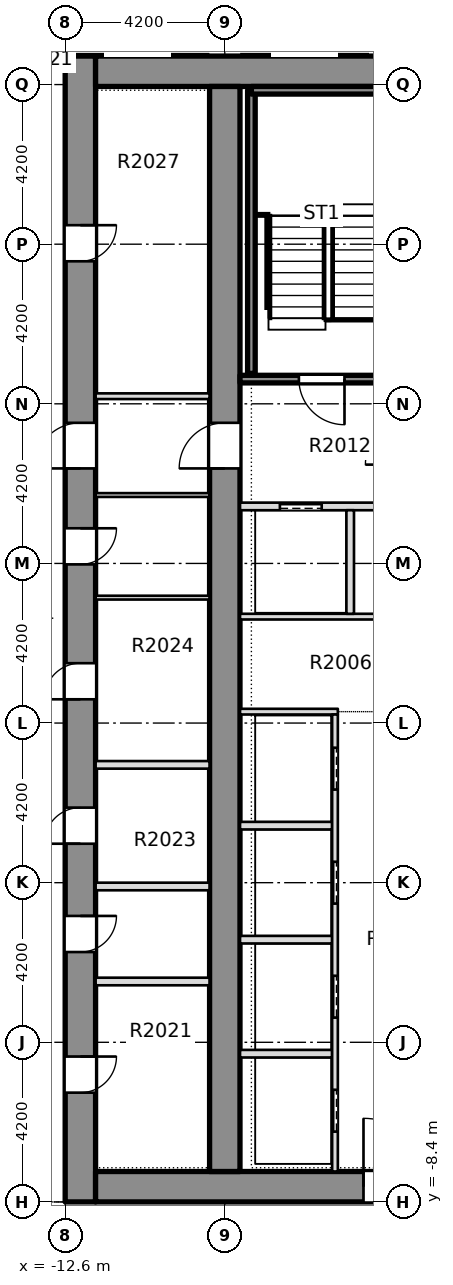
"""IFC4 building model, lengths in metres.
Left out: names, types, materials, properties, quantities, classifications, styles, units other than length and angle.
Written with IfcOpenShell. Run it as: python <this file> out.ifc"""

import sys

from ifc_helpers import new_model, si_unit, direction, frame, frame_2d, origin, place, context, subcontext, project, spatial, rectangle, extrude, element, fill, save


model = new_model("IFC4")
c1 = context("Model", 3, precision=1e-05, world=origin(), true_north=direction((0.0, 1.0)))
c2 = subcontext(c1, "Body", "Model", "MODEL_VIEW")
j1 = project(units=[si_unit("LENGTHUNIT", "METRE"), si_unit("PLANEANGLEUNIT", "RADIAN")], contexts=[c1])
p1 = place(None, origin())
s1 = spatial("IfcSite", under=j1, at=p1, CompositionType="ELEMENT")
p2 = place(p1, origin())
s2 = spatial("IfcBuilding", under=s1, at=p2, CompositionType="ELEMENT")
p3 = place(p2, frame((0.0, 0.0, 83.85)))
s3 = spatial("IfcBuildingStorey", under=s2, at=p3, CompositionType="ELEMENT", Elevation=83.85)
p4 = place(p3, frame((-12.2, -8.4, -0.32), z_axis=(0.0, 0.0, 1.0), x_axis=(0.0, 1.0, 0.0)))
e1 = element("IfcWall", 1, at=p4, inside=s3, PredefinedType="SHEAR", context=c2, shape_type="SweptSolid", body=[
    extrude(rectangle(XDim=30.15, YDim=0.8, at=frame_2d((15.075, 0.0))), origin(), (0.0, 0.0, 1.0), 3.45),
])
p5 = place(p4, frame((2.875, 0.0, 0.32)))
e2 = element("IfcOpeningElement", 2, at=p5, cuts=e1, PredefinedType="OPENING", context=c2, shape_type="SweptSolid", body=[
    extrude(rectangle(XDim=0.95, YDim=2.1, at=frame_2d((0.475, 1.05))), frame((0.0, 0.41, 0.0), z_axis=(0.0, -1.0, 0.0), x_axis=(1.0, 0.0, 0.0)), (0.0, 0.0, 1.0), 0.82),
])
p6 = place(p4, frame((6.575, 0.0, 0.32)))
e3 = element("IfcOpeningElement", 3, at=p6, cuts=e1, PredefinedType="OPENING", context=c2, shape_type="SweptSolid", body=[
    extrude(rectangle(XDim=0.95, YDim=2.1, at=frame_2d((0.475, 1.05))), frame((0.0, 0.41, 0.0), z_axis=(0.0, -1.0, 0.0), x_axis=(1.0, 0.0, 0.0)), (0.0, 0.0, 1.0), 0.82),
])
p7 = place(p4, frame((9.425, 0.0, 0.32)))
e4 = element("IfcOpeningElement", 4, at=p7, cuts=e1, PredefinedType="OPENING", context=c2, shape_type="SweptSolid", body=[
    extrude(rectangle(XDim=0.95, YDim=2.1, at=frame_2d((0.475, 1.05))), frame((0.0, 0.41, 0.0), z_axis=(0.0, -1.0, 0.0), x_axis=(1.0, 0.0, 0.0)), (0.0, 0.0, 1.0), 0.82),
])
p8 = place(p4, frame((13.225, 0.0, 0.32)))
e5 = element("IfcOpeningElement", 5, at=p8, cuts=e1, PredefinedType="OPENING", context=c2, shape_type="SweptSolid", body=[
    extrude(rectangle(XDim=0.95, YDim=2.1, at=frame_2d((0.475, 1.05))), frame((0.0, 0.41, 0.0), z_axis=(0.0, -1.0, 0.0), x_axis=(1.0, 0.0, 0.0)), (0.0, 0.0, 1.0), 0.82),
])
p9 = place(p4, frame((16.775, 0.0, 0.32)))
e6 = element("IfcOpeningElement", 6, at=p9, cuts=e1, PredefinedType="OPENING", context=c2, shape_type="SweptSolid", body=[
    extrude(rectangle(XDim=0.95, YDim=2.1, at=frame_2d((0.475, 1.05))), frame((0.0, 0.41, 0.0), z_axis=(0.0, -1.0, 0.0), x_axis=(1.0, 0.0, 0.0)), (0.0, 0.0, 1.0), 0.82),
])
p10 = place(p4, frame((24.75, 0.0, 0.32)))
e7 = element("IfcOpeningElement", 7, at=p10, cuts=e1, PredefinedType="OPENING", context=c2, shape_type="SweptSolid", body=[
    extrude(rectangle(XDim=0.95, YDim=2.1, at=frame_2d((0.475, 1.05))), frame((0.0, 0.41, 0.0), z_axis=(0.0, -1.0, 0.0), x_axis=(1.0, 0.0, 0.0)), (0.0, 0.0, 1.0), 0.82),
])
p11 = place(p4, frame((19.3, 0.0, 0.32)))
e8 = element("IfcOpeningElement", 8, at=p11, cuts=e1, PredefinedType="OPENING", context=c2, shape_type="SweptSolid", body=[
    extrude(rectangle(XDim=1.2, YDim=2.1, at=frame_2d((0.6, 1.05))), frame((0.0, 0.41, 0.0), z_axis=(0.0, -1.0, 0.0), x_axis=(1.0, 0.0, 0.0)), (0.0, 0.0, 1.0), 0.82),
])
p12 = place(p3, frame((-11.8, -8.0, -0.32), z_axis=(0.0, 0.0, 1.0), x_axis=(1.0, 0.0, 0.0)))
e9 = element("IfcWall", 9, at=p12, inside=s3, PredefinedType="SHEAR", context=c2, shape_type="SweptSolid", body=[
    extrude(rectangle(XDim=23.6, YDim=0.8, at=frame_2d((11.8, 0.0))), origin(), (0.0, 0.0, 1.0), 3.45),
])
p13 = place(p12, frame((7.05, 0.0, 0.32)))
e10 = element("IfcOpeningElement", 10, at=p13, cuts=e9, PredefinedType="OPENING", context=c2, shape_type="SweptSolid", body=[
    extrude(rectangle(XDim=1.8, YDim=2.1, at=frame_2d((0.9, 1.05))), frame((0.0, 0.41, 0.0), z_axis=(0.0, -1.0, 0.0), x_axis=(1.0, 0.0, 0.0)), (0.0, 0.0, 1.0), 0.82),
])
p14 = place(p12, frame((14.75, 0.0, 0.32)))
e11 = element("IfcOpeningElement", 11, at=p14, cuts=e9, PredefinedType="OPENING", context=c2, shape_type="SweptSolid", body=[
    extrude(rectangle(XDim=1.8, YDim=2.1, at=frame_2d((0.9, 1.05))), frame((0.0, 0.41, 0.0), z_axis=(0.0, -1.0, 0.0), x_axis=(1.0, 0.0, 0.0)), (0.0, 0.0, 1.0), 0.82),
])
p15 = place(p3, frame((-11.8, 21.35, -0.32), z_axis=(0.0, 0.0, 1.0), x_axis=(1.0, 0.0, 0.0)))
e12 = element("IfcWall", 12, at=p15, inside=s3, PredefinedType="SHEAR", context=c2, shape_type="SweptSolid", body=[
    extrude(rectangle(XDim=23.6, YDim=0.8, at=frame_2d((11.8, 0.0))), origin(), (0.0, 0.0, 1.0), 3.45),
])
p16 = place(p3, frame((-8.4, -7.6, -0.32), z_axis=(0.0, 0.0, 1.0), x_axis=(0.0, 1.0, 0.0)))
e13 = element("IfcWall", 13, at=p16, inside=s3, PredefinedType="SHEAR", context=c2, shape_type="SweptSolid", body=[
    extrude(rectangle(XDim=28.55, YDim=0.8, at=frame_2d((14.275, 0.0))), origin(), (0.0, 0.0, 1.0), 3.45),
])
p17 = place(p16, frame((18.5, 0.0, 0.32)))
e14 = element("IfcOpeningElement", 14, at=p17, cuts=e13, PredefinedType="OPENING", context=c2, shape_type="SweptSolid", body=[
    extrude(rectangle(XDim=1.2, YDim=2.1, at=frame_2d((0.6, 1.05))), frame((0.0, 0.41, 0.0), z_axis=(0.0, -1.0, 0.0), x_axis=(1.0, 0.0, 0.0)), (0.0, 0.0, 1.0), 0.82),
])
p18 = place(p3, frame((-12.6, 21.65, 0.0), z_axis=(0.0, 0.0, 1.0), x_axis=(-1.0, 0.0, 0.0)))
e15 = element("IfcWall", 15, at=p18, inside=s3, PredefinedType="STANDARD", context=c2, shape_type="SweptSolid", body=[
    extrude(rectangle(XDim=3.6, YDim=0.2, at=frame_2d((1.8, 0.0))), origin(), (0.0, 0.0, 1.0), 3.13),
])
p19 = place(p18, frame((0.35, 0.0, 0.2)))
e16 = element("IfcOpeningElement", 16, at=p19, cuts=e15, PredefinedType="OPENING", context=c2, shape_type="SweptSolid", body=[
    extrude(rectangle(XDim=1.8, YDim=2.65, at=frame_2d((0.9, 1.325))), frame((0.0, 0.11, 0.0), z_axis=(0.0, -1.0, 0.0), x_axis=(1.0, 0.0, 0.0)), (0.0, 0.0, 1.0), 0.22),
])
p20 = place(p18, frame((2.3, 0.0, 0.0)))
e17 = element("IfcOpeningElement", 17, at=p20, cuts=e15, PredefinedType="OPENING", context=c2, shape_type="SweptSolid", body=[
    extrude(rectangle(XDim=1.0, YDim=2.4, at=frame_2d((0.5, 1.2))), frame((0.0, 0.11, 0.0), z_axis=(0.0, -1.0, 0.0), x_axis=(1.0, 0.0, 0.0)), (0.0, 0.0, 1.0), 0.22),
])
for number, where, z_axis, x_axis in (
    (18, (-7.999, -4.5, 0.0), (0.0, 0.0, 1.0), (1.0, 0.0, 0.0)),
    (19, (-7.999, -1.5, 0.0), (0.0, 0.0, 1.0), (1.0, 0.0, 0.0)),
    (20, (-7.999, 1.5, 0.0), (0.0, 0.0, 1.0), (1.0, 0.0, 0.0)),
):
    element("IfcWall", number, at=place(p3, frame(where, z_axis=z_axis, x_axis=x_axis)), inside=s3, PredefinedType="PARTITIONING", context=c2, shape_type="SweptSolid", body=[
        extrude(rectangle(XDim=2.424, YDim=0.2, at=frame_2d((1.212, 0.0))), origin(), (0.0, 0.0, 1.0), 3.13),
    ])
p21 = place(p3, frame((-7.999, 4.5, 0.0), z_axis=(0.0, 0.0, 1.0), x_axis=(1.0, 0.0, 0.0)))
e21 = element("IfcWall", 21, at=p21, inside=s3, PredefinedType="PARTITIONING", context=c2, shape_type="SweptSolid", body=[
    extrude(rectangle(XDim=2.574, YDim=0.15, at=frame_2d((1.287, 0.0))), origin(), (0.0, 0.0, 1.0), 3.13),
])
p22 = place(p3, frame((-7.999, 7.0, 0.0), z_axis=(0.0, 0.0, 1.0), x_axis=(1.0, 0.0, 0.0)))
e22 = element("IfcWall", 22, at=p22, inside=s3, PredefinedType="PARTITIONING", context=c2, shape_type="SweptSolid", body=[
    extrude(rectangle(XDim=15.998, YDim=0.15, at=frame_2d((7.999, 0.0))), origin(), (0.0, 0.0, 1.0), 3.13),
])
p23 = place(p22, frame((7.299, 0.0, 0.0)))
e23 = element("IfcOpeningElement", 23, at=p23, cuts=e22, PredefinedType="OPENING", context=c2, shape_type="SweptSolid", body=[
    extrude(rectangle(XDim=1.4, YDim=2.1, at=frame_2d((0.7, 1.05))), frame((0.0, 0.085, 0.0), z_axis=(0.0, -1.0, 0.0), x_axis=(1.0, 0.0, 0.0)), (0.0, 0.0, 1.0), 0.17),
])
p24 = place(p3, frame((-7.999, 9.9, 0.0), z_axis=(0.0, 0.0, 1.0), x_axis=(1.0, 0.0, 0.0)))
e24 = element("IfcWall", 24, at=p24, inside=s3, PredefinedType="PARTITIONING", context=c2, shape_type="SweptSolid", body=[
    extrude(rectangle(XDim=4.399, YDim=0.2, at=frame_2d((2.199, 0.0))), origin(), (0.0, 0.0, 1.0), 3.13),
])
p25 = place(p24, frame((1.049, 0.0, 0.0)))
e25 = element("IfcOpeningElement", 25, at=p25, cuts=e24, PredefinedType="OPENING", context=c2, shape_type="SweptSolid", body=[
    extrude(rectangle(XDim=1.1, YDim=2.1, at=frame_2d((0.55, 1.05))), frame((0.0, 0.11, 0.0), z_axis=(0.0, -1.0, 0.0), x_axis=(1.0, 0.0, 0.0)), (0.0, 0.0, 1.0), 0.22),
])
p26 = place(p3, frame((-7.999, 13.25, 0.0), z_axis=(0.0, 0.0, 1.0), x_axis=(1.0, 0.0, 0.0)))
e26 = element("IfcWall", 26, at=p26, inside=s3, PredefinedType="SOLIDWALL", context=c2, shape_type="SweptSolid", body=[
    extrude(rectangle(XDim=4.574, YDim=0.2, at=frame_2d((2.287, 0.0))), origin(), (0.0, 0.0, 1.0), 3.13),
])
p27 = place(p26, frame((1.549, 0.0, 0.0)))
e27 = element("IfcOpeningElement", 27, at=p27, cuts=e26, PredefinedType="OPENING", context=c2, shape_type="SweptSolid", body=[
    extrude(rectangle(XDim=1.2, YDim=2.1, at=frame_2d((0.6, 1.05))), frame((0.0, 0.11, 0.0), z_axis=(0.0, -1.0, 0.0), x_axis=(1.0, 0.0, 0.0)), (0.0, 0.0, 1.0), 0.22),
])
p28 = place(p3, frame((-5.5, -7.599, 0.0), z_axis=(0.0, 0.0, 1.0), x_axis=(0.0, 1.0, 0.0)))
e28 = element("IfcWall", 28, at=p28, inside=s3, PredefinedType="PARTITIONING", context=c2, shape_type="SweptSolid", body=[
    extrude(rectangle(XDim=12.024, YDim=0.15, at=frame_2d((6.012, 0.0))), origin(), (0.0, 0.0, 1.0), 3.13),
])
p29 = place(p28, frame((1.049, 0.0, 0.0)))
e29 = element("IfcOpeningElement", 29, at=p29, cuts=e28, PredefinedType="OPENING", context=c2, shape_type="SweptSolid", body=[
    extrude(rectangle(XDim=1.1, YDim=2.1, at=frame_2d((0.55, 1.05))), frame((0.0, 0.085, 0.0), z_axis=(0.0, -1.0, 0.0), x_axis=(1.0, 0.0, 0.0)), (0.0, 0.0, 1.0), 0.17),
])
p30 = place(p28, frame((4.049, 0.0, 0.0)))
e30 = element("IfcOpeningElement", 30, at=p30, cuts=e28, PredefinedType="OPENING", context=c2, shape_type="SweptSolid", body=[
    extrude(rectangle(XDim=1.1, YDim=2.1, at=frame_2d((0.55, 1.05))), frame((0.0, 0.085, 0.0), z_axis=(0.0, -1.0, 0.0), x_axis=(1.0, 0.0, 0.0)), (0.0, 0.0, 1.0), 0.17),
])
p31 = place(p28, frame((7.049, 0.0, 0.0)))
e31 = element("IfcOpeningElement", 31, at=p31, cuts=e28, PredefinedType="OPENING", context=c2, shape_type="SweptSolid", body=[
    extrude(rectangle(XDim=1.1, YDim=2.1, at=frame_2d((0.55, 1.05))), frame((0.0, 0.085, 0.0), z_axis=(0.0, -1.0, 0.0), x_axis=(1.0, 0.0, 0.0)), (0.0, 0.0, 1.0), 0.17),
])
p32 = place(p28, frame((10.049, 0.0, 0.0)))
e32 = element("IfcOpeningElement", 32, at=p32, cuts=e28, PredefinedType="OPENING", context=c2, shape_type="SweptSolid", body=[
    extrude(rectangle(XDim=1.1, YDim=2.1, at=frame_2d((0.55, 1.05))), frame((0.0, 0.085, 0.0), z_axis=(0.0, -1.0, 0.0), x_axis=(1.0, 0.0, 0.0)), (0.0, 0.0, 1.0), 0.17),
])
p33 = place(p3, frame((-5.1, 7.075, 0.0), z_axis=(0.0, 0.0, 1.0), x_axis=(0.0, 1.0, 0.0)))
e33 = element("IfcWall", 33, at=p33, inside=s3, PredefinedType="PARTITIONING", context=c2, shape_type="SweptSolid", body=[
    extrude(rectangle(XDim=2.725, YDim=0.2, at=frame_2d((1.363, 0.0))), origin(), (0.0, 0.0, 1.0), 3.13),
])
for number, where, z_axis, x_axis in (
    (34, (-11.799, -2.6, 0.0), (0.0, 0.0, 1.0), (1.0, 0.0, 0.0)),
    (35, (-11.799, -0.1, 0.0), (0.0, 0.0, 1.0), (1.0, 0.0, 0.0)),
    (36, (-11.799, 3.1, 0.0), (0.0, 0.0, 1.0), (1.0, 0.0, 0.0)),
):
    element("IfcWall", number, at=place(p3, frame(where, z_axis=z_axis, x_axis=x_axis)), inside=s3, PredefinedType="PARTITIONING", context=c2, shape_type="SweptSolid", body=[
        extrude(rectangle(XDim=2.998, YDim=0.2, at=frame_2d((1.499, 0.0))), origin(), (0.0, 0.0, 1.0), 3.13),
    ])
for number, where, z_axis, x_axis in (
    (37, (-11.799, 7.5, 0.0), (0.0, 0.0, 1.0), (1.0, 0.0, 0.0)),
    (38, (-11.799, 10.2, 0.0), (0.0, 0.0, 1.0), (1.0, 0.0, 0.0)),
):
    element("IfcWall", number, at=place(p3, frame(where, z_axis=z_axis, x_axis=x_axis)), inside=s3, PredefinedType="PARTITIONING", context=c2, shape_type="SweptSolid", body=[
        extrude(rectangle(XDim=2.998, YDim=0.1, at=frame_2d((1.499, 0.0))), origin(), (0.0, 0.0, 1.0), 3.13),
    ])
p34 = place(p3, frame((-11.799, 12.8, 0.0), z_axis=(0.0, 0.0, 1.0), x_axis=(1.0, 0.0, 0.0)))
e39 = element("IfcWall", 39, at=p34, inside=s3, PredefinedType="PARTITIONING", context=c2, shape_type="SweptSolid", body=[
    extrude(rectangle(XDim=2.998, YDim=0.15, at=frame_2d((1.499, 0.0))), origin(), (0.0, 0.0, 1.0), 3.13),
])
p35 = place(p3, frame((-7.7, 13.4, 0.0), z_axis=(0.0, 0.0, 1.0), x_axis=(0.0, 1.0, 0.0)))
e40 = element("IfcWall", 40, at=p35, inside=s3, PredefinedType="SOLIDWALL", context=c2, shape_type="SweptSolid", body=[
    extrude(rectangle(XDim=7.45, YDim=0.2, at=frame_2d((3.725, 0.0))), origin(), (0.0, 0.0, 1.0), 3.13),
])
p36 = place(p3, frame((-7.7, 20.85, 0.0), z_axis=(0.0, 0.0, 1.0), x_axis=(1.0, 0.0, 0.0)))
e41 = element("IfcWall", 41, at=p36, inside=s3, PredefinedType="SOLIDWALL", context=c2, shape_type="SweptSolid", body=[
    extrude(rectangle(XDim=3.55, YDim=0.2, at=frame_2d((1.775, 0.0))), origin(), (0.0, 0.0, 1.0), 3.13),
])
p37 = place(p29, origin())
e42 = element("IfcDoor", 42, at=p37, inside=s3, OperationType="SLIDING_TO_LEFT", PredefinedType="DOOR", context=c2, shape_type="SweptSolid", body=[
    extrude(rectangle(XDim=1.1, YDim=2.1, at=frame_2d((0.55, 1.05))), frame((0.0, 0.025, 0.0), z_axis=(0.0, -1.0, 0.0), x_axis=(1.0, 0.0, 0.0)), (0.0, 0.0, 1.0), 0.05),
])
fill(e29, e42)
p38 = place(p30, origin())
e43 = element("IfcDoor", 43, at=p38, inside=s3, OperationType="SLIDING_TO_LEFT", PredefinedType="DOOR", context=c2, shape_type="SweptSolid", body=[
    extrude(rectangle(XDim=1.1, YDim=2.1, at=frame_2d((0.55, 1.05))), frame((0.0, 0.025, 0.0), z_axis=(0.0, -1.0, 0.0), x_axis=(1.0, 0.0, 0.0)), (0.0, 0.0, 1.0), 0.05),
])
fill(e30, e43)
p39 = place(p31, origin())
e44 = element("IfcDoor", 44, at=p39, inside=s3, OperationType="SLIDING_TO_LEFT", PredefinedType="DOOR", context=c2, shape_type="SweptSolid", body=[
    extrude(rectangle(XDim=1.1, YDim=2.1, at=frame_2d((0.55, 1.05))), frame((0.0, 0.025, 0.0), z_axis=(0.0, -1.0, 0.0), x_axis=(1.0, 0.0, 0.0)), (0.0, 0.0, 1.0), 0.05),
])
fill(e31, e44)
p40 = place(p32, origin())
e45 = element("IfcDoor", 45, at=p40, inside=s3, OperationType="SLIDING_TO_LEFT", PredefinedType="DOOR", context=c2, shape_type="SweptSolid", body=[
    extrude(rectangle(XDim=1.1, YDim=2.1, at=frame_2d((0.55, 1.05))), frame((0.0, 0.025, 0.0), z_axis=(0.0, -1.0, 0.0), x_axis=(1.0, 0.0, 0.0)), (0.0, 0.0, 1.0), 0.05),
])
fill(e32, e45)
p41 = place(p27, origin())
e46 = element("IfcDoor", 46, at=p41, inside=s3, OperationType="SINGLE_SWING_LEFT", PredefinedType="DOOR", context=c2, shape_type="SweptSolid", body=[
    extrude(rectangle(XDim=1.2, YDim=2.1, at=frame_2d((0.6, 1.05))), frame((0.0, 0.025, 0.0), z_axis=(0.0, -1.0, 0.0), x_axis=(1.0, 0.0, 0.0)), (0.0, 0.0, 1.0), 0.05),
])
fill(e27, e46)
p42 = place(p25, origin())
e47 = element("IfcDoor", 47, at=p42, inside=s3, OperationType="SLIDING_TO_LEFT", PredefinedType="DOOR", context=c2, shape_type="SweptSolid", body=[
    extrude(rectangle(XDim=1.1, YDim=2.1, at=frame_2d((0.55, 1.05))), frame((0.0, 0.025, 0.0), z_axis=(0.0, -1.0, 0.0), x_axis=(1.0, 0.0, 0.0)), (0.0, 0.0, 1.0), 0.05),
])
fill(e25, e47)
p43 = place(p13, origin())
e48 = element("IfcDoor", 48, at=p43, inside=s3, OperationType="SINGLE_SWING_LEFT", PredefinedType="DOOR", context=c2, shape_type="SweptSolid", body=[
    extrude(rectangle(XDim=1.8, YDim=2.1, at=frame_2d((0.9, 1.05))), frame((0.0, 0.025, 0.0), z_axis=(0.0, -1.0, 0.0), x_axis=(1.0, 0.0, 0.0)), (0.0, 0.0, 1.0), 0.05),
])
fill(e10, e48)
p44 = place(p5, origin())
e49 = element("IfcDoor", 49, at=p44, inside=s3, OperationType="SINGLE_SWING_LEFT", PredefinedType="DOOR", context=c2, shape_type="SweptSolid", body=[
    extrude(rectangle(XDim=0.95, YDim=2.1, at=frame_2d((0.475, 1.05))), frame((0.0, 0.025, 0.0), z_axis=(0.0, -1.0, 0.0), x_axis=(1.0, 0.0, 0.0)), (0.0, 0.0, 1.0), 0.05),
])
fill(e2, e49)
p45 = place(p6, origin())
e50 = element("IfcDoor", 50, at=p45, inside=s3, OperationType="SINGLE_SWING_LEFT", PredefinedType="DOOR", context=c2, shape_type="SweptSolid", body=[
    extrude(rectangle(XDim=0.95, YDim=2.1, at=frame_2d((0.475, 1.05))), frame((0.0, 0.025, 0.0), z_axis=(0.0, -1.0, 0.0), x_axis=(1.0, 0.0, 0.0)), (0.0, 0.0, 1.0), 0.05),
])
fill(e3, e50)
p46 = place(p7, origin())
e51 = element("IfcDoor", 51, at=p46, inside=s3, OperationType="SINGLE_SWING_LEFT", PredefinedType="DOOR", context=c2, shape_type="SweptSolid", body=[
    extrude(rectangle(XDim=0.95, YDim=2.1, at=frame_2d((0.475, 1.05))), frame((0.0, 0.025, 0.0), z_axis=(0.0, -1.0, 0.0), x_axis=(1.0, 0.0, 0.0)), (0.0, 0.0, 1.0), 0.05),
])
fill(e4, e51)
p47 = place(p8, origin())
e52 = element("IfcDoor", 52, at=p47, inside=s3, OperationType="SINGLE_SWING_LEFT", PredefinedType="DOOR", context=c2, shape_type="SweptSolid", body=[
    extrude(rectangle(XDim=0.95, YDim=2.1, at=frame_2d((0.475, 1.05))), frame((0.0, 0.025, 0.0), z_axis=(0.0, -1.0, 0.0), x_axis=(1.0, 0.0, 0.0)), (0.0, 0.0, 1.0), 0.05),
])
fill(e5, e52)
p48 = place(p9, origin())
e53 = element("IfcDoor", 53, at=p48, inside=s3, OperationType="SINGLE_SWING_LEFT", PredefinedType="DOOR", context=c2, shape_type="SweptSolid", body=[
    extrude(rectangle(XDim=0.95, YDim=2.1, at=frame_2d((0.475, 1.05))), frame((0.0, 0.025, 0.0), z_axis=(0.0, -1.0, 0.0), x_axis=(1.0, 0.0, 0.0)), (0.0, 0.0, 1.0), 0.05),
])
fill(e6, e53)
p49 = place(p10, origin())
e54 = element("IfcDoor", 54, at=p49, inside=s3, OperationType="SINGLE_SWING_LEFT", PredefinedType="DOOR", context=c2, shape_type="SweptSolid", body=[
    extrude(rectangle(XDim=0.95, YDim=2.1, at=frame_2d((0.475, 1.05))), frame((0.0, 0.025, 0.0), z_axis=(0.0, -1.0, 0.0), x_axis=(1.0, 0.0, 0.0)), (0.0, 0.0, 1.0), 0.05),
])
fill(e7, e54)
p50 = place(p11, origin())
e55 = element("IfcDoor", 55, at=p50, inside=s3, OperationType="SINGLE_SWING_LEFT", PredefinedType="DOOR", context=c2, shape_type="SweptSolid", body=[
    extrude(rectangle(XDim=1.2, YDim=2.1, at=frame_2d((0.6, 1.05))), frame((0.0, 0.025, 0.0), z_axis=(0.0, -1.0, 0.0), x_axis=(1.0, 0.0, 0.0)), (0.0, 0.0, 1.0), 0.05),
])
fill(e8, e55)
p51 = place(p17, origin())
e56 = element("IfcDoor", 56, at=p51, inside=s3, OperationType="SINGLE_SWING_LEFT", PredefinedType="DOOR", context=c2, shape_type="SweptSolid", body=[
    extrude(rectangle(XDim=1.2, YDim=2.1, at=frame_2d((0.6, 1.05))), frame((0.0, 0.025, 0.0), z_axis=(0.0, -1.0, 0.0), x_axis=(1.0, 0.0, 0.0)), (0.0, 0.0, 1.0), 0.05),
])
fill(e14, e56)
save(model, sys.argv[1])
